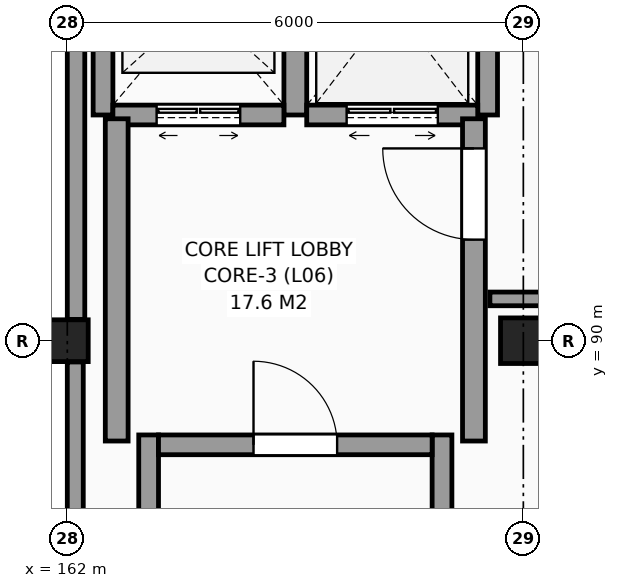
"""IFC4 building model, lengths in metres.
Left out: names, types, materials, properties, quantities, classifications, styles, units other than length and angle.
Written with IfcOpenShell. Run it as: python <this file> out.ifc"""

import sys

from ifc_helpers import new_model, si_unit, direction, frame, frame_2d, origin, origin_2d, place, context, subcontext, project, spatial, rectangle, extrude, element, fill, save


model = new_model("IFC4")
c1 = context("Model", 3, precision=1e-05, world=origin(), true_north=direction((0.0, 1.0)))
c2 = subcontext(c1, "Body", "Model", "MODEL_VIEW")
j1 = project(units=[si_unit("LENGTHUNIT", "METRE"), si_unit("PLANEANGLEUNIT", "RADIAN")], contexts=[c1])
p1 = place(None, origin())
s1 = spatial("IfcSite", under=j1, at=p1, CompositionType="ELEMENT")
p2 = place(p1, origin())
s2 = spatial("IfcBuilding", under=s1, at=p2, CompositionType="ELEMENT")
p3 = place(p2, frame((0.0, 0.0, 28.2)))
s3 = spatial("IfcBuildingStorey", under=s2, at=p3, CompositionType="ELEMENT", Elevation=28.2)
p4 = place(p3, frame((162.0, 90.0, 0.0), z_axis=(0.0, 0.0, 1.0), x_axis=(1.0, 0.0, 0.0)))
e1 = element("IfcColumn", 1, at=p4, inside=s3, PredefinedType="COLUMN", context=c2, shape_type="SweptSolid", body=[
    extrude(rectangle(XDim=0.55, YDim=0.55, at=origin_2d()), origin(), (0.0, 0.0, 1.0), 3.3),
])
p5 = place(p3, frame((168.0, 90.0, 0.0), z_axis=(0.0, 0.0, 1.0), x_axis=(1.0, 0.0, 0.0)))
e2 = element("IfcColumn", 2, at=p5, inside=s3, PredefinedType="COLUMN", context=c2, shape_type="SweptSolid", body=[
    extrude(rectangle(XDim=0.6, YDim=0.6, at=origin_2d()), origin(), (0.0, 0.0, 1.0), 3.3),
])
p6 = place(p3, frame((162.115, 95.72, 0.0), z_axis=(0.0, 0.0, 1.0), x_axis=(0.0, -1.0, 0.0)))
e3 = element("IfcWall", 3, at=p6, inside=s3, PredefinedType="SOLIDWALL", context=c2, shape_type="SweptSolid", body=[
    extrude(rectangle(XDim=5.44, YDim=0.23, at=frame_2d((2.72, 0.0))), origin(), (0.0, 0.0, 1.0), 2.43),
])
p7 = place(p3, frame((162.105, 89.72, 0.0), z_axis=(0.0, 0.0, 1.0), x_axis=(0.0, -1.0, 0.0)))
e4 = element("IfcWall", 4, at=p7, inside=s3, PredefinedType="SOLIDWALL", context=c2, shape_type="SweptSolid", body=[
    extrude(rectangle(XDim=5.44, YDim=0.21, at=frame_2d((2.72, 0.0))), origin(), (0.0, 0.0, 1.0), 2.43),
])
for number, where, z_axis, x_axis in (
    (5, (163.07, 78.04, 0.0), (0.0, 0.0, 1.0), (0.0, 1.0, 0.0)),
    (6, (166.93, 78.04, 0.0), (0.0, 0.0, 1.0), (0.0, 1.0, 0.0)),
):
    element("IfcWall", number, at=place(p3, frame(where, z_axis=z_axis, x_axis=x_axis)), inside=s3, PredefinedType="SHEAR", context=c2, shape_type="SweptSolid", body=[
        extrude(rectangle(XDim=10.72, YDim=0.26, at=frame_2d((5.36, 0.0))), origin(), (0.0, 0.0, 1.0), 3.3),
    ])
p8 = place(p3, frame((163.2, 88.63, 0.0), z_axis=(0.0, 0.0, 1.0), x_axis=(1.0, 0.0, 0.0)))
e7 = element("IfcWall", 7, at=p8, inside=s3, PredefinedType="SHEAR", context=c2, shape_type="SweptSolid", body=[
    extrude(rectangle(XDim=3.6, YDim=0.26, at=frame_2d((1.8, 0.0))), origin(), (0.0, 0.0, 1.0), 3.3),
])
p9 = place(p8, frame((1.25, 0.0, 0.0)))
e8 = element("IfcOpeningElement", 8, at=p9, cuts=e7, PredefinedType="OPENING", context=c2, shape_type="SweptSolid", body=[
    extrude(rectangle(XDim=1.1, YDim=2.15, at=frame_2d((0.55, 1.075))), frame((0.0, 0.14, 0.0), z_axis=(0.0, -1.0, 0.0), x_axis=(1.0, 0.0, 0.0)), (0.0, 0.0, 1.0), 0.28),
])
p10 = place(p3, frame((162.47, 92.97, 0.0), z_axis=(0.0, 0.0, 1.0), x_axis=(0.0, 1.0, 0.0)))
e9 = element("IfcWall", 9, at=p10, inside=s3, PredefinedType="SHEAR", context=c2, shape_type="SweptSolid", body=[
    extrude(rectangle(XDim=2.91, YDim=0.26, at=frame_2d((1.455, 0.0))), origin(), (0.0, 0.0, 1.0), 3.3),
])
p11 = place(p3, frame((165.0, 92.97, 0.0), z_axis=(0.0, 0.0, 1.0), x_axis=(0.0, 1.0, 0.0)))
e10 = element("IfcWall", 10, at=p11, inside=s3, PredefinedType="SHEAR", context=c2, shape_type="SweptSolid", body=[
    extrude(rectangle(XDim=2.91, YDim=0.3, at=frame_2d((1.455, 0.0))), origin(), (0.0, 0.0, 1.0), 3.3),
])
p12 = place(p3, frame((162.6, 92.97, 0.0), z_axis=(0.0, 0.0, 1.0), x_axis=(1.0, 0.0, 0.0)))
e11 = element("IfcWall", 11, at=p12, inside=s3, PredefinedType="SHEAR", context=c2, shape_type="SweptSolid", body=[
    extrude(rectangle(XDim=2.25, YDim=0.26, at=frame_2d((1.125, 0.0))), origin(), (0.0, 0.0, 1.0), 3.3),
])
p13 = place(p12, frame((0.575, 0.0, 0.0)))
e12 = element("IfcOpeningElement", 12, at=p13, cuts=e11, PredefinedType="OPENING", context=c2, shape_type="SweptSolid", body=[
    extrude(rectangle(XDim=1.1, YDim=2.2, at=frame_2d((0.55, 1.1))), frame((0.0, 0.14, 0.0), z_axis=(0.0, -1.0, 0.0), x_axis=(1.0, 0.0, 0.0)), (0.0, 0.0, 1.0), 0.28),
])
p14 = place(p3, frame((167.53, 92.97, 0.0), z_axis=(0.0, 0.0, 1.0), x_axis=(0.0, 1.0, 0.0)))
e13 = element("IfcWall", 13, at=p14, inside=s3, PredefinedType="SHEAR", context=c2, shape_type="SweptSolid", body=[
    extrude(rectangle(XDim=2.91, YDim=0.26, at=frame_2d((1.455, 0.0))), origin(), (0.0, 0.0, 1.0), 3.3),
])
p15 = place(p3, frame((165.15, 92.97, 0.0), z_axis=(0.0, 0.0, 1.0), x_axis=(1.0, 0.0, 0.0)))
e14 = element("IfcWall", 14, at=p15, inside=s3, PredefinedType="SHEAR", context=c2, shape_type="SweptSolid", body=[
    extrude(rectangle(XDim=2.25, YDim=0.26, at=frame_2d((1.125, 0.0))), origin(), (0.0, 0.0, 1.0), 3.3),
])
p16 = place(p15, frame((0.525, 0.0, 0.0)))
e15 = element("IfcOpeningElement", 15, at=p16, cuts=e14, PredefinedType="OPENING", context=c2, shape_type="SweptSolid", body=[
    extrude(rectangle(XDim=1.2, YDim=2.25, at=frame_2d((0.6, 1.125))), frame((0.0, 0.14, 0.0), z_axis=(0.0, -1.0, 0.0), x_axis=(1.0, 0.0, 0.0)), (0.0, 0.0, 1.0), 0.28),
])
p17 = place(p3, frame((167.35, 88.68, 0.0), z_axis=(0.0, 0.0, 1.0), x_axis=(0.0, 1.0, 0.0)))
e16 = element("IfcWall", 16, at=p17, inside=s3, PredefinedType="SHEAR", context=c2, shape_type="SweptSolid", body=[
    extrude(rectangle(XDim=4.24, YDim=0.3, at=frame_2d((2.12, 0.0))), origin(), (0.0, 0.0, 1.0), 3.3),
])
p18 = place(p17, frame((2.65, 0.0, 0.0)))
e17 = element("IfcOpeningElement", 17, at=p18, cuts=e16, PredefinedType="OPENING", context=c2, shape_type="SweptSolid", body=[
    extrude(rectangle(XDim=1.2, YDim=2.2, at=frame_2d((0.6, 1.1))), frame((0.0, 0.16, 0.0), z_axis=(0.0, -1.0, 0.0), x_axis=(1.0, 0.0, 0.0)), (0.0, 0.0, 1.0), 0.32),
])
p19 = place(p3, frame((162.65, 88.68, 0.0), z_axis=(0.0, 0.0, 1.0), x_axis=(0.0, 1.0, 0.0)))
e18 = element("IfcWall", 18, at=p19, inside=s3, PredefinedType="SHEAR", context=c2, shape_type="SweptSolid", body=[
    extrude(rectangle(XDim=4.24, YDim=0.3, at=frame_2d((2.12, 0.0))), origin(), (0.0, 0.0, 1.0), 3.3),
])
p20 = place(p3, frame((167.56, 90.55, 0.0), z_axis=(0.0, 0.0, 1.0), x_axis=(1.0, 0.0, 0.0)))
e19 = element("IfcWall", 19, at=p20, inside=s3, PredefinedType="PARTITIONING", context=c2, shape_type="SweptSolid", body=[
    extrude(rectangle(XDim=2.24, YDim=0.18, at=frame_2d((1.12, 0.0))), origin(), (0.0, 0.0, 1.0), 3.08),
])
p21 = place(p9, origin())
e20 = element("IfcDoor", 20, at=p21, inside=s3, OperationType="SINGLE_SWING_LEFT", PredefinedType="DOOR", context=c2, shape_type="SweptSolid", body=[
    extrude(rectangle(XDim=1.1, YDim=2.15, at=frame_2d((0.55, 1.075))), frame((0.0, 0.025, 0.0), z_axis=(0.0, -1.0, 0.0), x_axis=(1.0, 0.0, 0.0)), (0.0, 0.0, 1.0), 0.05),
])
fill(e8, e20)
p22 = place(p13, origin())
e21 = element("IfcDoor", 21, at=p22, inside=s3, OperationType="DOUBLE_DOOR_SLIDING", PredefinedType="DOOR", context=c2, shape_type="SweptSolid", body=[
    extrude(rectangle(XDim=1.1, YDim=2.2, at=frame_2d((0.55, 1.1))), frame((0.0, 0.025, 0.0), z_axis=(0.0, -1.0, 0.0), x_axis=(1.0, 0.0, 0.0)), (0.0, 0.0, 1.0), 0.05),
])
fill(e12, e21)
p23 = place(p16, origin())
e22 = element("IfcDoor", 22, at=p23, inside=s3, OperationType="DOUBLE_DOOR_SLIDING", PredefinedType="DOOR", context=c2, shape_type="SweptSolid", body=[
    extrude(rectangle(XDim=1.2, YDim=2.25, at=frame_2d((0.6, 1.125))), frame((0.0, 0.025, 0.0), z_axis=(0.0, -1.0, 0.0), x_axis=(1.0, 0.0, 0.0)), (0.0, 0.0, 1.0), 0.05),
])
fill(e15, e22)
p24 = place(p18, origin())
e23 = element("IfcDoor", 23, at=p24, inside=s3, OperationType="SINGLE_SWING_RIGHT", PredefinedType="DOOR", context=c2, shape_type="SweptSolid", body=[
    extrude(rectangle(XDim=1.2, YDim=2.2, at=frame_2d((0.6, 1.1))), frame((0.0, 0.025, 0.0), z_axis=(0.0, -1.0, 0.0), x_axis=(1.0, 0.0, 0.0)), (0.0, 0.0, 1.0), 0.05),
])
fill(e17, e23)
save(model, sys.argv[1])
